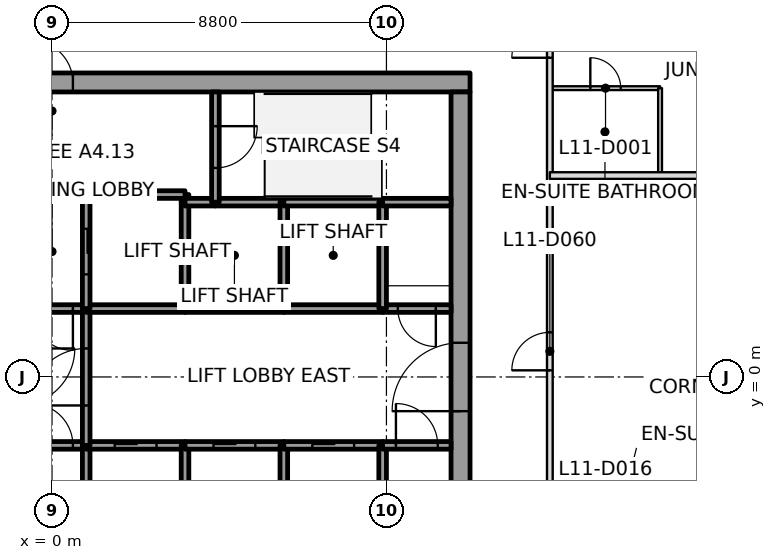
"""IFC4 building model, lengths in metres.
Left out: names, types, materials, properties, quantities, classifications, styles, units other than length and angle.
Written with IfcOpenShell. Run it as: python <this file> out.ifc"""

import sys

from ifc_helpers import new_model, si_unit, direction, frame, frame_2d, origin, place, context, subcontext, project, spatial, rectangle, extrude, element, fill, save


model = new_model("IFC4")
c1 = context("Model", 3, precision=1e-05, world=origin(), true_north=direction((0.0, 1.0)))
c2 = subcontext(c1, "Body", "Model", "MODEL_VIEW")
j1 = project(units=[si_unit("LENGTHUNIT", "METRE"), si_unit("PLANEANGLEUNIT", "RADIAN")], contexts=[c1])
p1 = place(None, origin())
s1 = spatial("IfcSite", under=j1, at=p1, CompositionType="ELEMENT")
p2 = place(p1, origin())
s2 = spatial("IfcBuilding", under=s1, at=p2, CompositionType="ELEMENT")
p3 = place(p2, frame((0.0, 0.0, 62.8)))
s3 = spatial("IfcBuildingStorey", under=s2, at=p3, CompositionType="ELEMENT", Elevation=62.8)
p4 = place(p3, frame((-11.0, 7.75, 0.0), z_axis=(0.0, 0.0, 1.0), x_axis=(1.0, 0.0, 0.0)))
e1 = element("IfcWall", 1, at=p4, inside=s3, PredefinedType="SHEAR", context=c2, shape_type="SweptSolid", body=[
    extrude(rectangle(XDim=22.0, YDim=0.5, at=frame_2d((11.0, 0.0))), origin(), (0.0, 0.0, 1.0), 3.7),
])
p5 = place(p4, frame((10.45, 0.0, 0.0)))
e2 = element("IfcOpeningElement", 2, at=p5, cuts=e1, PredefinedType="OPENING", context=c2, shape_type="SweptSolid", body=[
    extrude(rectangle(XDim=1.1, YDim=2.1, at=frame_2d((0.55, 1.05))), frame((0.0, 0.25, 0.0), z_axis=(0.0, -1.0, 0.0), x_axis=(1.0, 0.0, 0.0)), (0.0, 0.0, 1.0), 0.5),
])
p6 = place(p3, frame((10.75, -7.5, 0.0), z_axis=(0.0, 0.0, 1.0), x_axis=(0.0, 1.0, 0.0)))
e3 = element("IfcWall", 3, at=p6, inside=s3, PredefinedType="SHEAR", context=c2, shape_type="SweptSolid", body=[
    extrude(rectangle(XDim=15.0, YDim=0.5, at=frame_2d((7.5, 0.0))), origin(), (0.0, 0.0, 1.0), 3.7),
])
p7 = place(p6, frame((6.6, 0.0, 0.0)))
e4 = element("IfcOpeningElement", 4, at=p7, cuts=e3, PredefinedType="OPENING", context=c2, shape_type="SweptSolid", body=[
    extrude(rectangle(XDim=1.8, YDim=2.1, at=frame_2d((0.9, 1.05))), frame((0.0, 0.25, 0.0), z_axis=(0.0, -1.0, 0.0), x_axis=(1.0, 0.0, 0.0)), (0.0, 0.0, 1.0), 0.5),
])
p8 = place(p3, frame((-0.9, -1.8, 0.0), z_axis=(0.0, 0.0, 1.0), x_axis=(1.0, 0.0, 0.0)))
e5 = element("IfcWall", 5, at=p8, inside=s3, PredefinedType="SOLIDWALL", context=c2, shape_type="SweptSolid", body=[
    extrude(rectangle(XDim=1.8, YDim=0.2, at=frame_2d((0.9, 0.0))), origin(), (0.0, 0.0, 1.0), 3.55),
])
p9 = place(p8, frame((0.35, 0.0, 0.0)))
e6 = element("IfcOpeningElement", 6, at=p9, cuts=e5, PredefinedType="OPENING", context=c2, shape_type="SweptSolid", body=[
    extrude(rectangle(XDim=1.1, YDim=2.1, at=frame_2d((0.55, 1.05))), frame((0.0, 0.1, 0.0), z_axis=(0.0, -1.0, 0.0), x_axis=(1.0, 0.0, 0.0)), (0.0, 0.0, 1.0), 0.2),
])
p10 = place(p3, frame((0.9, 1.8, 0.0), z_axis=(0.0, 0.0, 1.0), x_axis=(-1.0, 0.0, 0.0)))
e7 = element("IfcWall", 7, at=p10, inside=s3, PredefinedType="SOLIDWALL", context=c2, shape_type="SweptSolid", body=[
    extrude(rectangle(XDim=1.8, YDim=0.2, at=frame_2d((0.9, 0.0))), origin(), (0.0, 0.0, 1.0), 3.55),
])
p11 = place(p10, frame((0.35, 0.0, 0.0)))
e8 = element("IfcOpeningElement", 8, at=p11, cuts=e7, PredefinedType="OPENING", context=c2, shape_type="SweptSolid", body=[
    extrude(rectangle(XDim=1.1, YDim=2.1, at=frame_2d((0.55, 1.05))), frame((0.0, 0.1, 0.0), z_axis=(0.0, -1.0, 0.0), x_axis=(1.0, 0.0, 0.0)), (0.0, 0.0, 1.0), 0.2),
])
p12 = place(p3, frame((0.9, -1.8, 0.0), z_axis=(0.0, 0.0, 1.0), x_axis=(0.0, -1.0, 0.0)))
e9 = element("IfcWall", 9, at=p12, inside=s3, PredefinedType="SOLIDWALL", context=c2, shape_type="SweptSolid", body=[
    extrude(rectangle(XDim=2.8, YDim=0.2, at=frame_2d((1.4, 0.0))), origin(), (0.0, 0.0, 1.0), 3.55),
])
p13 = place(p3, frame((0.9, -1.8, 0.0), z_axis=(0.0, 0.0, 1.0), x_axis=(1.0, 0.0, 0.0)))
e10 = element("IfcWall", 10, at=p13, inside=s3, PredefinedType="SOLIDWALL", context=c2, shape_type="SweptSolid", body=[
    extrude(rectangle(XDim=2.6, YDim=0.2, at=frame_2d((1.3, 0.0))), origin(), (0.0, 0.0, 1.0), 3.55),
])
p14 = place(p13, frame((0.75, 0.0, 0.0)))
e11 = element("IfcOpeningElement", 11, at=p14, cuts=e10, PredefinedType="OPENING", context=c2, shape_type="SweptSolid", body=[
    extrude(rectangle(XDim=1.1, YDim=2.1, at=frame_2d((0.55, 1.05))), frame((0.0, 0.1, 0.0), z_axis=(0.0, -1.0, 0.0), x_axis=(1.0, 0.0, 0.0)), (0.0, 0.0, 1.0), 0.2),
])
p15 = place(p3, frame((0.9, -1.8, 0.0), z_axis=(0.0, 0.0, 1.0), x_axis=(0.0, 1.0, 0.0)))
e12 = element("IfcWall", 12, at=p15, inside=s3, PredefinedType="SOLIDWALL", context=c2, shape_type="SweptSolid", body=[
    extrude(rectangle(XDim=3.6, YDim=0.2, at=frame_2d((1.8, 0.0))), origin(), (0.0, 0.0, 1.0), 3.55),
])
p16 = place(p15, frame((1.05, 0.0, 0.0)))
e13 = element("IfcOpeningElement", 13, at=p16, cuts=e12, PredefinedType="OPENING", context=c2, shape_type="SweptSolid", body=[
    extrude(rectangle(XDim=1.5, YDim=2.1, at=frame_2d((0.75, 1.05))), frame((0.0, 0.1, 0.0), z_axis=(0.0, -1.0, 0.0), x_axis=(1.0, 0.0, 0.0)), (0.0, 0.0, 1.0), 0.2),
])
p17 = place(p3, frame((3.5, 1.8, 0.0), z_axis=(0.0, 0.0, 1.0), x_axis=(-1.0, 0.0, 0.0)))
e14 = element("IfcWall", 14, at=p17, inside=s3, PredefinedType="SOLIDWALL", context=c2, shape_type="SweptSolid", body=[
    extrude(rectangle(XDim=2.6, YDim=0.2, at=frame_2d((1.3, 0.0))), origin(), (0.0, 0.0, 1.0), 3.55),
])
p18 = place(p3, frame((3.5, 4.6, 0.0), z_axis=(0.0, 0.0, 1.0), x_axis=(0.0, 1.0, 0.0)))
e15 = element("IfcWall", 15, at=p18, inside=s3, PredefinedType="SOLIDWALL", context=c2, shape_type="SweptSolid", body=[
    extrude(rectangle(XDim=0.2, YDim=0.2, at=frame_2d((0.1, 0.0))), origin(), (0.0, 0.0, 1.0), 3.55),
])
p19 = place(p3, frame((3.5, 4.8, 0.0), z_axis=(0.0, 0.0, 1.0), x_axis=(-1.0, 0.0, 0.0)))
e16 = element("IfcWall", 16, at=p19, inside=s3, PredefinedType="SOLIDWALL", context=c2, shape_type="SweptSolid", body=[
    extrude(rectangle(XDim=2.6, YDim=0.2, at=frame_2d((1.3, 0.0))), origin(), (0.0, 0.0, 1.0), 3.55),
])
p20 = place(p3, frame((0.9, 4.8, 0.0), z_axis=(0.0, 0.0, 1.0), x_axis=(0.0, -1.0, 0.0)))
e17 = element("IfcWall", 17, at=p20, inside=s3, PredefinedType="SOLIDWALL", context=c2, shape_type="SweptSolid", body=[
    extrude(rectangle(XDim=3.0, YDim=0.2, at=frame_2d((1.5, 0.0))), origin(), (0.0, 0.0, 1.0), 3.55),
])
p21 = place(p20, frame((0.9, 0.0, 0.0)))
e18 = element("IfcOpeningElement", 18, at=p21, cuts=e17, PredefinedType="OPENING", context=c2, shape_type="SweptSolid", body=[
    extrude(rectangle(XDim=1.2, YDim=2.1, at=frame_2d((0.6, 1.05))), frame((0.0, 0.1, 0.0), z_axis=(0.0, -1.0, 0.0), x_axis=(1.0, 0.0, 0.0)), (0.0, 0.0, 1.0), 0.2),
])
p22 = place(p3, frame((3.5, -4.6, 0.0), z_axis=(0.0, 0.0, 1.0), x_axis=(0.0, 1.0, 0.0)))
e19 = element("IfcWall", 19, at=p22, inside=s3, PredefinedType="SOLIDWALL", context=c2, shape_type="SweptSolid", body=[
    extrude(rectangle(XDim=2.8, YDim=0.2, at=frame_2d((1.4, 0.0))), origin(), (0.0, 0.0, 1.0), 3.55),
])
p23 = place(p3, frame((3.5, -1.8, 0.0), z_axis=(0.0, 0.0, 1.0), x_axis=(1.0, 0.0, 0.0)))
e20 = element("IfcWall", 20, at=p23, inside=s3, PredefinedType="SOLIDWALL", context=c2, shape_type="SweptSolid", body=[
    extrude(rectangle(XDim=2.6, YDim=0.2, at=frame_2d((1.3, 0.0))), origin(), (0.0, 0.0, 1.0), 3.55),
])
p24 = place(p23, frame((0.75, 0.0, 0.0)))
e21 = element("IfcOpeningElement", 21, at=p24, cuts=e20, PredefinedType="OPENING", context=c2, shape_type="SweptSolid", body=[
    extrude(rectangle(XDim=1.1, YDim=2.1, at=frame_2d((0.55, 1.05))), frame((0.0, 0.1, 0.0), z_axis=(0.0, -1.0, 0.0), x_axis=(1.0, 0.0, 0.0)), (0.0, 0.0, 1.0), 0.2),
])
p25 = place(p3, frame((6.1, 1.8, 0.0), z_axis=(0.0, 0.0, 1.0), x_axis=(-1.0, 0.0, 0.0)))
e22 = element("IfcWall", 22, at=p25, inside=s3, PredefinedType="SOLIDWALL", context=c2, shape_type="SweptSolid", body=[
    extrude(rectangle(XDim=2.6, YDim=0.2, at=frame_2d((1.3, 0.0))), origin(), (0.0, 0.0, 1.0), 3.55),
])
p26 = place(p3, frame((3.5, 1.8, 0.0), z_axis=(0.0, 0.0, 1.0), x_axis=(0.0, 1.0, 0.0)))
e23 = element("IfcWall", 23, at=p26, inside=s3, PredefinedType="SOLIDWALL", context=c2, shape_type="SweptSolid", body=[
    extrude(rectangle(XDim=2.8, YDim=0.2, at=frame_2d((1.4, 0.0))), origin(), (0.0, 0.0, 1.0), 3.55),
])
p27 = place(p3, frame((4.3, 4.6, 0.0), z_axis=(0.0, 0.0, 1.0), x_axis=(-1.0, 0.0, 0.0)))
e24 = element("IfcWall", 24, at=p27, inside=s3, PredefinedType="SOLIDWALL", context=c2, shape_type="SweptSolid", body=[
    extrude(rectangle(XDim=0.8, YDim=0.2, at=frame_2d((0.4, 0.0))), origin(), (0.0, 0.0, 1.0), 3.55),
])
p28 = place(p3, frame((6.1, 4.6, 0.0), z_axis=(0.0, 0.0, 1.0), x_axis=(-1.0, 0.0, 0.0)))
e25 = element("IfcWall", 25, at=p28, inside=s3, PredefinedType="SOLIDWALL", context=c2, shape_type="SweptSolid", body=[
    extrude(rectangle(XDim=1.8, YDim=0.2, at=frame_2d((0.9, 0.0))), origin(), (0.0, 0.0, 1.0), 3.55),
])
p29 = place(p3, frame((4.3, 7.5, 0.0), z_axis=(0.0, 0.0, 1.0), x_axis=(0.0, -1.0, 0.0)))
e26 = element("IfcWall", 26, at=p29, inside=s3, PredefinedType="SOLIDWALL", context=c2, shape_type="SweptSolid", body=[
    extrude(rectangle(XDim=2.9, YDim=0.2, at=frame_2d((1.45, 0.0))), origin(), (0.0, 0.0, 1.0), 3.55),
])
p30 = place(p29, frame((0.9, 0.0, 0.0)))
e27 = element("IfcOpeningElement", 27, at=p30, cuts=e26, PredefinedType="OPENING", context=c2, shape_type="SweptSolid", body=[
    extrude(rectangle(XDim=1.1, YDim=2.1, at=frame_2d((0.55, 1.05))), frame((0.0, 0.1, 0.0), z_axis=(0.0, -1.0, 0.0), x_axis=(1.0, 0.0, 0.0)), (0.0, 0.0, 1.0), 0.2),
])
p31 = place(p3, frame((6.1, -4.6, 0.0), z_axis=(0.0, 0.0, 1.0), x_axis=(0.0, 1.0, 0.0)))
e28 = element("IfcWall", 28, at=p31, inside=s3, PredefinedType="SOLIDWALL", context=c2, shape_type="SweptSolid", body=[
    extrude(rectangle(XDim=2.8, YDim=0.2, at=frame_2d((1.4, 0.0))), origin(), (0.0, 0.0, 1.0), 3.55),
])
p32 = place(p3, frame((6.1, -1.8, 0.0), z_axis=(0.0, 0.0, 1.0), x_axis=(1.0, 0.0, 0.0)))
e29 = element("IfcWall", 29, at=p32, inside=s3, PredefinedType="SOLIDWALL", context=c2, shape_type="SweptSolid", body=[
    extrude(rectangle(XDim=2.6, YDim=0.2, at=frame_2d((1.3, 0.0))), origin(), (0.0, 0.0, 1.0), 3.55),
])
p33 = place(p32, frame((0.75, 0.0, 0.0)))
e30 = element("IfcOpeningElement", 30, at=p33, cuts=e29, PredefinedType="OPENING", context=c2, shape_type="SweptSolid", body=[
    extrude(rectangle(XDim=1.1, YDim=2.1, at=frame_2d((0.55, 1.05))), frame((0.0, 0.1, 0.0), z_axis=(0.0, -1.0, 0.0), x_axis=(1.0, 0.0, 0.0)), (0.0, 0.0, 1.0), 0.2),
])
p34 = place(p3, frame((8.7, 1.8, 0.0), z_axis=(0.0, 0.0, 1.0), x_axis=(-1.0, 0.0, 0.0)))
e31 = element("IfcWall", 31, at=p34, inside=s3, PredefinedType="SOLIDWALL", context=c2, shape_type="SweptSolid", body=[
    extrude(rectangle(XDim=2.6, YDim=0.2, at=frame_2d((1.3, 0.0))), origin(), (0.0, 0.0, 1.0), 3.55),
])
p35 = place(p3, frame((6.1, 1.8, 0.0), z_axis=(0.0, 0.0, 1.0), x_axis=(0.0, 1.0, 0.0)))
e32 = element("IfcWall", 32, at=p35, inside=s3, PredefinedType="SOLIDWALL", context=c2, shape_type="SweptSolid", body=[
    extrude(rectangle(XDim=2.8, YDim=0.2, at=frame_2d((1.4, 0.0))), origin(), (0.0, 0.0, 1.0), 3.55),
])
p36 = place(p3, frame((8.7, 4.6, 0.0), z_axis=(0.0, 0.0, 1.0), x_axis=(-1.0, 0.0, 0.0)))
e33 = element("IfcWall", 33, at=p36, inside=s3, PredefinedType="SOLIDWALL", context=c2, shape_type="SweptSolid", body=[
    extrude(rectangle(XDim=2.6, YDim=0.2, at=frame_2d((1.3, 0.0))), origin(), (0.0, 0.0, 1.0), 3.55),
])
p37 = place(p3, frame((8.7, -1.8, 0.0), z_axis=(0.0, 0.0, 1.0), x_axis=(0.0, -1.0, 0.0)))
e34 = element("IfcWall", 34, at=p37, inside=s3, PredefinedType="SOLIDWALL", context=c2, shape_type="SweptSolid", body=[
    extrude(rectangle(XDim=2.8, YDim=0.2, at=frame_2d((1.4, 0.0))), origin(), (0.0, 0.0, 1.0), 3.55),
])
p38 = place(p3, frame((8.7, -1.8, 0.0), z_axis=(0.0, 0.0, 1.0), x_axis=(1.0, 0.0, 0.0)))
e35 = element("IfcWall", 35, at=p38, inside=s3, PredefinedType="SOLIDWALL", context=c2, shape_type="SweptSolid", body=[
    extrude(rectangle(XDim=1.8, YDim=0.2, at=frame_2d((0.9, 0.0))), origin(), (0.0, 0.0, 1.0), 3.55),
])
p39 = place(p38, frame((0.35, 0.0, 0.0)))
e36 = element("IfcOpeningElement", 36, at=p39, cuts=e35, PredefinedType="OPENING", context=c2, shape_type="SweptSolid", body=[
    extrude(rectangle(XDim=1.1, YDim=2.1, at=frame_2d((0.55, 1.05))), frame((0.0, 0.1, 0.0), z_axis=(0.0, -1.0, 0.0), x_axis=(1.0, 0.0, 0.0)), (0.0, 0.0, 1.0), 0.2),
])
p40 = place(p3, frame((10.5, 1.8, 0.0), z_axis=(0.0, 0.0, 1.0), x_axis=(-1.0, 0.0, 0.0)))
e37 = element("IfcWall", 37, at=p40, inside=s3, PredefinedType="SOLIDWALL", context=c2, shape_type="SweptSolid", body=[
    extrude(rectangle(XDim=1.8, YDim=0.2, at=frame_2d((0.9, 0.0))), origin(), (0.0, 0.0, 1.0), 3.55),
])
p41 = place(p40, frame((0.4, 0.0, 0.0)))
e38 = element("IfcOpeningElement", 38, at=p41, cuts=e37, PredefinedType="OPENING", context=c2, shape_type="SweptSolid", body=[
    extrude(rectangle(XDim=1.0, YDim=2.1, at=frame_2d((0.5, 1.05))), frame((0.0, 0.1, 0.0), z_axis=(0.0, -1.0, 0.0), x_axis=(1.0, 0.0, 0.0)), (0.0, 0.0, 1.0), 0.2),
])
p42 = place(p3, frame((8.7, 4.6, 0.0), z_axis=(0.0, 0.0, 1.0), x_axis=(0.0, -1.0, 0.0)))
e39 = element("IfcWall", 39, at=p42, inside=s3, PredefinedType="SOLIDWALL", context=c2, shape_type="SweptSolid", body=[
    extrude(rectangle(XDim=2.8, YDim=0.2, at=frame_2d((1.4, 0.0))), origin(), (0.0, 0.0, 1.0), 3.55),
])
p43 = place(p3, frame((10.5, 4.6, 0.0), z_axis=(0.0, 0.0, 1.0), x_axis=(-1.0, 0.0, 0.0)))
e40 = element("IfcWall", 40, at=p43, inside=s3, PredefinedType="SOLIDWALL", context=c2, shape_type="SweptSolid", body=[
    extrude(rectangle(XDim=1.8, YDim=0.2, at=frame_2d((0.9, 0.0))), origin(), (0.0, 0.0, 1.0), 3.55),
])
p44 = place(p3, frame((19.827, 5.3, 0.0), z_axis=(0.0, 0.0, 1.0), x_axis=(-1.0, 0.0, 0.0)))
e41 = element("IfcWall", 41, at=p44, inside=s3, PredefinedType="PARTITIONING", context=c2, shape_type="SweptSolid", body=[
    extrude(rectangle(XDim=6.727, YDim=0.175, at=frame_2d((3.363, 0.0))), origin(), (0.0, 0.0, 1.0), 3.093),
])
p45 = place(p3, frame((13.1, -6.351, 0.0), z_axis=(0.0, 0.0, 1.0), x_axis=(0.0, 1.0, 0.0)))
e42 = element("IfcWall", 42, at=p45, inside=s3, PredefinedType="PARTITIONING", context=c2, shape_type="SweptSolid", body=[
    extrude(rectangle(XDim=16.371, YDim=0.15, at=frame_2d((8.186, 0.0))), origin(), (0.0, 0.0, 1.0), 3.017),
])
p46 = place(p45, frame((14.751, 0.0, 0.0)))
e43 = element("IfcOpeningElement", 43, at=p46, cuts=e42, PredefinedType="OPENING", context=c2, shape_type="SweptSolid", body=[
    extrude(rectangle(XDim=1.0, YDim=2.1, at=frame_2d((0.5, 1.05))), frame((0.0, 0.075, 0.0), z_axis=(0.0, -1.0, 0.0), x_axis=(1.0, 0.0, 0.0)), (0.0, 0.0, 1.0), 0.15),
])
p47 = place(p45, frame((6.525, 0.0, 0.0)))
e44 = element("IfcOpeningElement", 44, at=p47, cuts=e42, PredefinedType="OPENING", context=c2, shape_type="SweptSolid", body=[
    extrude(rectangle(XDim=1.0, YDim=2.1, at=frame_2d((0.5, 1.05))), frame((0.0, 0.075, 0.0), z_axis=(0.0, -1.0, 0.0), x_axis=(1.0, 0.0, 0.0)), (0.0, 0.0, 1.0), 0.15),
])
p48 = place(p3, frame((13.13, 7.6, 0.0), z_axis=(0.0, 0.0, 1.0), x_axis=(1.0, 0.0, 0.0)))
e45 = element("IfcWall", 45, at=p48, inside=s3, PredefinedType="PARTITIONING", context=c2, shape_type="SweptSolid", body=[
    extrude(rectangle(XDim=2.87, YDim=0.1, at=frame_2d((1.435, 0.0))), origin(), (0.0, 0.0, 1.0), 3.15),
])
p49 = place(p48, frame((1.035, 0.0, 0.0)))
e46 = element("IfcOpeningElement", 46, at=p49, cuts=e45, PredefinedType="OPENING", context=c2, shape_type="SweptSolid", body=[
    extrude(rectangle(XDim=0.8, YDim=2.1, at=frame_2d((0.4, 1.05))), frame((0.0, 0.05, 0.0), z_axis=(0.0, -1.0, 0.0), x_axis=(1.0, 0.0, 0.0)), (0.0, 0.0, 1.0), 0.1),
])
p50 = place(p3, frame((16.0, 7.6, 0.0), z_axis=(0.0, 0.0, 1.0), x_axis=(0.0, -1.0, 0.0)))
e47 = element("IfcWall", 47, at=p50, inside=s3, PredefinedType="PARTITIONING", context=c2, shape_type="SweptSolid", body=[
    extrude(rectangle(XDim=2.27, YDim=0.1, at=frame_2d((1.135, 0.0))), origin(), (0.0, 0.0, 1.0), 3.093),
])
p51 = place(p46, origin())
e48 = element("IfcDoor", 48, at=p51, inside=s3, OperationType="SINGLE_SWING_LEFT", PredefinedType="DOOR", context=c2, shape_type="SweptSolid", body=[
    extrude(rectangle(XDim=1.0, YDim=2.1, at=frame_2d((0.5, 1.05))), frame((0.0, 0.025, 0.0), z_axis=(0.0, -1.0, 0.0), x_axis=(1.0, 0.0, 0.0)), (0.0, 0.0, 1.0), 0.05),
])
fill(e43, e48)
p52 = place(p49, origin())
e49 = element("IfcDoor", 49, at=p52, inside=s3, OperationType="SINGLE_SWING_LEFT", PredefinedType="DOOR", context=c2, shape_type="SweptSolid", body=[
    extrude(rectangle(XDim=0.8, YDim=2.1, at=frame_2d((0.4, 1.05))), frame((0.0, 0.025, 0.0), z_axis=(0.0, -1.0, 0.0), x_axis=(1.0, 0.0, 0.0)), (0.0, 0.0, 1.0), 0.05),
])
fill(e46, e49)
p53 = place(p47, origin())
e50 = element("IfcDoor", 50, at=p53, inside=s3, OperationType="SINGLE_SWING_LEFT", PredefinedType="DOOR", context=c2, shape_type="SweptSolid", body=[
    extrude(rectangle(XDim=1.0, YDim=2.1, at=frame_2d((0.5, 1.05))), frame((0.0, 0.025, 0.0), z_axis=(0.0, -1.0, 0.0), x_axis=(1.0, 0.0, 0.0)), (0.0, 0.0, 1.0), 0.05),
])
fill(e44, e50)
p54 = place(p14, origin())
e51 = element("IfcDoor", 51, at=p54, inside=s3, OperationType="SLIDING_TO_LEFT", PredefinedType="DOOR", context=c2, shape_type="SweptSolid", body=[
    extrude(rectangle(XDim=1.1, YDim=2.1, at=frame_2d((0.55, 1.05))), frame((0.0, 0.025, 0.0), z_axis=(0.0, -1.0, 0.0), x_axis=(1.0, 0.0, 0.0)), (0.0, 0.0, 1.0), 0.05),
])
fill(e11, e51)
p55 = place(p24, origin())
e52 = element("IfcDoor", 52, at=p55, inside=s3, OperationType="SLIDING_TO_LEFT", PredefinedType="DOOR", context=c2, shape_type="SweptSolid", body=[
    extrude(rectangle(XDim=1.1, YDim=2.1, at=frame_2d((0.55, 1.05))), frame((0.0, 0.025, 0.0), z_axis=(0.0, -1.0, 0.0), x_axis=(1.0, 0.0, 0.0)), (0.0, 0.0, 1.0), 0.05),
])
fill(e21, e52)
p56 = place(p33, origin())
e53 = element("IfcDoor", 53, at=p56, inside=s3, OperationType="SLIDING_TO_RIGHT", PredefinedType="DOOR", context=c2, shape_type="SweptSolid", body=[
    extrude(rectangle(XDim=1.1, YDim=2.1, at=frame_2d((0.55, 1.05))), frame((0.0, 0.025, 0.0), z_axis=(0.0, -1.0, 0.0), x_axis=(1.0, 0.0, 0.0)), (0.0, 0.0, 1.0), 0.05),
])
fill(e30, e53)
p57 = place(p21, origin())
e54 = element("IfcDoor", 54, at=p57, inside=s3, OperationType="SLIDING_TO_RIGHT", PredefinedType="DOOR", context=c2, shape_type="SweptSolid", body=[
    extrude(rectangle(XDim=1.2, YDim=2.1, at=frame_2d((0.6, 1.05))), frame((0.0, 0.025, 0.0), z_axis=(0.0, -1.0, 0.0), x_axis=(1.0, 0.0, 0.0)), (0.0, 0.0, 1.0), 0.05),
])
fill(e18, e54)
p58 = place(p16, origin())
e55 = element("IfcDoor", 55, at=p58, inside=s3, OperationType="DOUBLE_DOOR_SINGLE_SWING", PredefinedType="DOOR", context=c2, shape_type="SweptSolid", body=[
    extrude(rectangle(XDim=1.5, YDim=2.1, at=frame_2d((0.75, 1.05))), frame((0.0, 0.025, 0.0), z_axis=(0.0, -1.0, 0.0), x_axis=(1.0, 0.0, 0.0)), (0.0, 0.0, 1.0), 0.05),
])
fill(e13, e55)
p59 = place(p39, origin())
e56 = element("IfcDoor", 56, at=p59, inside=s3, OperationType="SINGLE_SWING_LEFT", PredefinedType="DOOR", context=c2, shape_type="SweptSolid", body=[
    extrude(rectangle(XDim=1.1, YDim=2.1, at=frame_2d((0.55, 1.05))), frame((0.0, 0.025, 0.0), z_axis=(0.0, -1.0, 0.0), x_axis=(1.0, 0.0, 0.0)), (0.0, 0.0, 1.0), 0.05),
])
fill(e36, e56)
p60 = place(p11, origin())
e57 = element("IfcDoor", 57, at=p60, inside=s3, OperationType="SINGLE_SWING_RIGHT", PredefinedType="DOOR", context=c2, shape_type="SweptSolid", body=[
    extrude(rectangle(XDim=1.1, YDim=2.1, at=frame_2d((0.55, 1.05))), frame((0.0, 0.025, 0.0), z_axis=(0.0, -1.0, 0.0), x_axis=(1.0, 0.0, 0.0)), (0.0, 0.0, 1.0), 0.05),
])
fill(e8, e57)
p61 = place(p9, origin())
e58 = element("IfcDoor", 58, at=p61, inside=s3, OperationType="SINGLE_SWING_LEFT", PredefinedType="DOOR", context=c2, shape_type="SweptSolid", body=[
    extrude(rectangle(XDim=1.1, YDim=2.1, at=frame_2d((0.55, 1.05))), frame((0.0, 0.025, 0.0), z_axis=(0.0, -1.0, 0.0), x_axis=(1.0, 0.0, 0.0)), (0.0, 0.0, 1.0), 0.05),
])
fill(e6, e58)
p62 = place(p41, origin())
e59 = element("IfcDoor", 59, at=p62, inside=s3, OperationType="SINGLE_SWING_LEFT", PredefinedType="DOOR", context=c2, shape_type="SweptSolid", body=[
    extrude(rectangle(XDim=1.0, YDim=2.1, at=frame_2d((0.5, 1.05))), frame((0.0, 0.025, 0.0), z_axis=(0.0, -1.0, 0.0), x_axis=(1.0, 0.0, 0.0)), (0.0, 0.0, 1.0), 0.05),
])
fill(e38, e59)
p63 = place(p30, origin())
e60 = element("IfcDoor", 60, at=p63, inside=s3, OperationType="SINGLE_SWING_LEFT", PredefinedType="DOOR", context=c2, shape_type="SweptSolid", body=[
    extrude(rectangle(XDim=1.1, YDim=2.1, at=frame_2d((0.55, 1.05))), frame((0.0, 0.025, 0.0), z_axis=(0.0, -1.0, 0.0), x_axis=(1.0, 0.0, 0.0)), (0.0, 0.0, 1.0), 0.05),
])
fill(e27, e60)
p64 = place(p7, origin())
e61 = element("IfcDoor", 61, at=p64, inside=s3, OperationType="DOUBLE_DOOR_SINGLE_SWING", PredefinedType="DOOR", context=c2, shape_type="SweptSolid", body=[
    extrude(rectangle(XDim=1.8, YDim=2.1, at=frame_2d((0.9, 1.05))), frame((0.0, 0.025, 0.0), z_axis=(0.0, -1.0, 0.0), x_axis=(1.0, 0.0, 0.0)), (0.0, 0.0, 1.0), 0.05),
])
fill(e4, e61)
p65 = place(p5, origin())
e62 = element("IfcDoor", 62, at=p65, inside=s3, OperationType="SINGLE_SWING_RIGHT", PredefinedType="DOOR", context=c2, shape_type="SweptSolid", body=[
    extrude(rectangle(XDim=1.1, YDim=2.1, at=frame_2d((0.55, 1.05))), frame((0.0, 0.025, 0.0), z_axis=(0.0, -1.0, 0.0), x_axis=(1.0, 0.0, 0.0)), (0.0, 0.0, 1.0), 0.05),
])
fill(e2, e62)
save(model, sys.argv[1])
